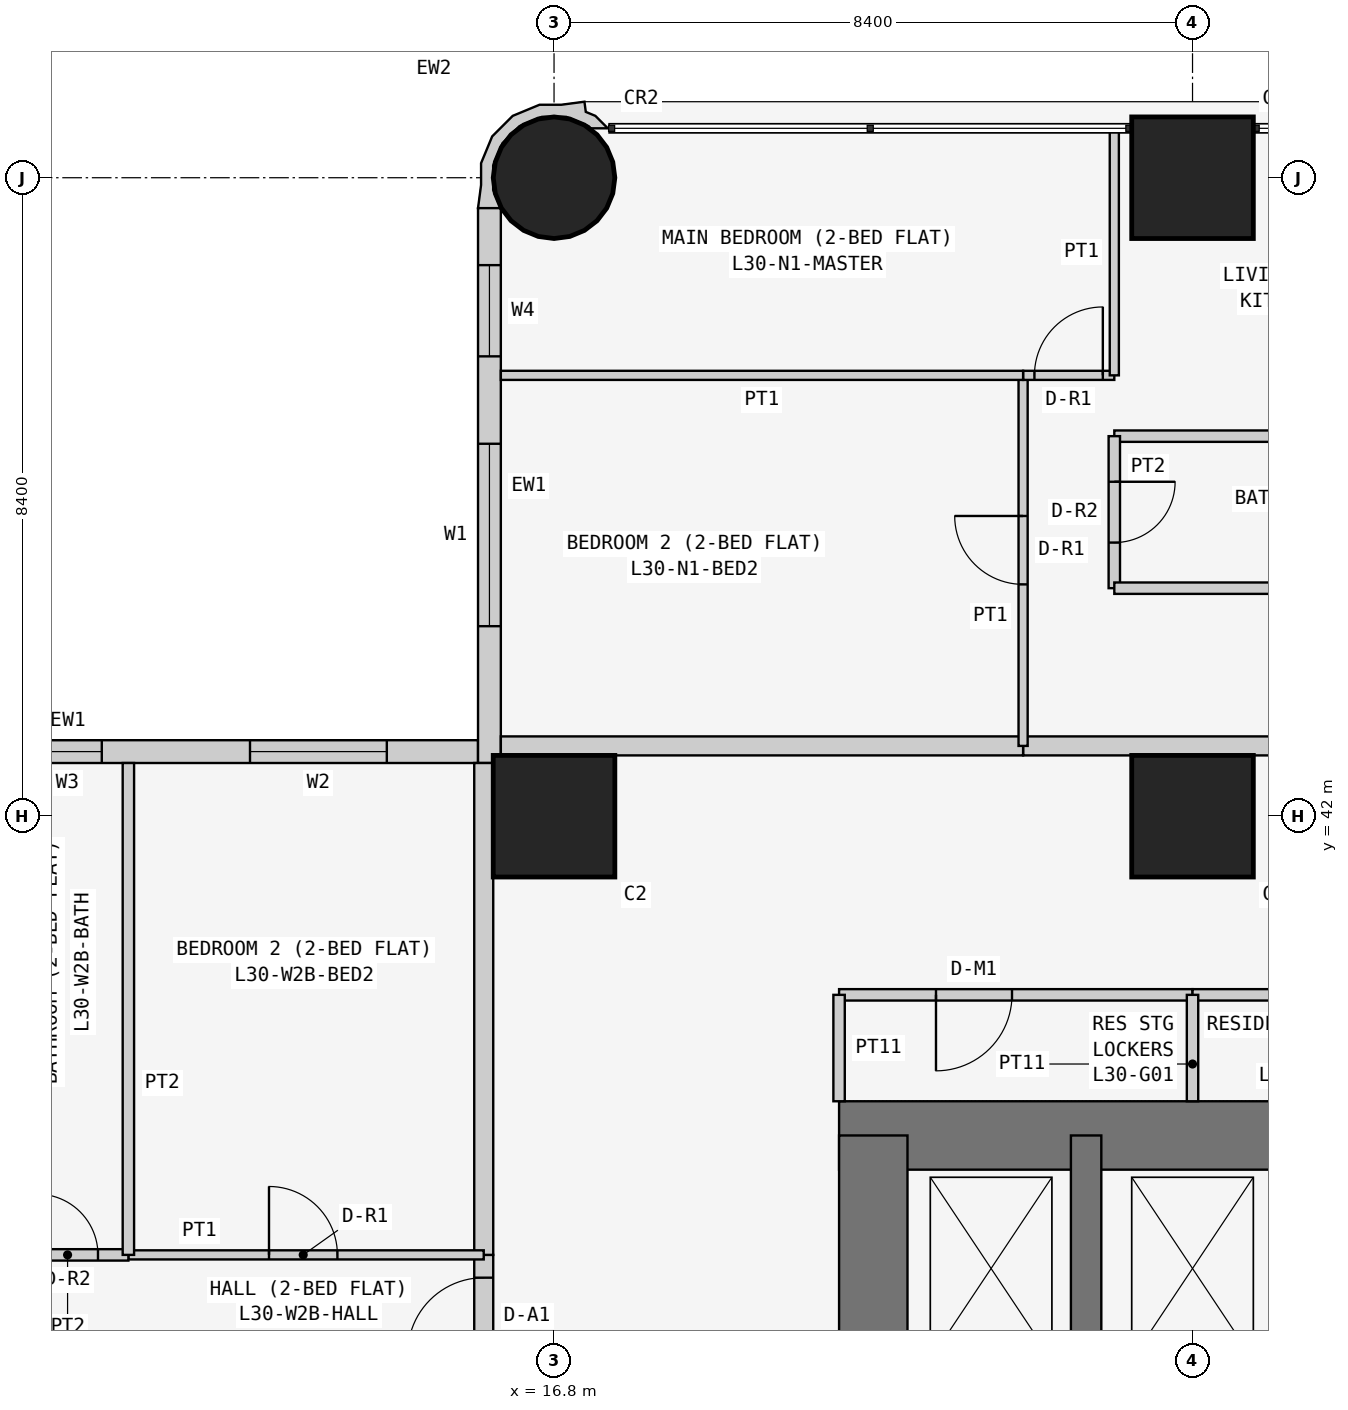
"""IFC4 building model, lengths in metres.
Left out: names, types, materials, properties, quantities, classifications, styles, units other than length and angle.
Written with IfcOpenShell. Run it as: python <this file> out.ifc"""

import sys

from ifc_helpers import new_model, si_unit, direction, frame, frame_2d, origin, origin_2d, place, context, subcontext, project, spatial, polyline, rectangle, circle, outline, extrude, element, fill, save


model = new_model("IFC4")
c1 = context("Model", 3, precision=1e-05, world=origin(), true_north=direction((0.0, 1.0)))
c2 = subcontext(c1, "Body", "Model", "MODEL_VIEW")
j1 = project(units=[si_unit("LENGTHUNIT", "METRE"), si_unit("PLANEANGLEUNIT", "RADIAN")], contexts=[c1])
p1 = place(None, origin())
s1 = spatial("IfcSite", under=j1, at=p1, CompositionType="ELEMENT")
p2 = place(p1, origin())
s2 = spatial("IfcBuilding", under=s1, at=p2, CompositionType="ELEMENT")
p3 = place(p2, frame((0.0, 0.0, 119.7)))
s3 = spatial("IfcBuildingStorey", under=s2, at=p3, CompositionType="ELEMENT", Elevation=119.7)
p4 = place(p3, frame((16.8, 42.0, 0.0), z_axis=(0.0, 0.0, 1.0), x_axis=(1.0, 0.0, 0.0)))
e1 = element("IfcColumn", 1, at=p4, inside=s3, PredefinedType="COLUMN", context=c2, shape_type="SweptSolid", body=[
    extrude(rectangle(XDim=1.6, YDim=1.6, at=origin_2d()), origin(), (0.0, 0.0, 1.0), 3.6),
])
p5 = place(p3, frame((16.8, 50.4, 0.0), z_axis=(0.0, 0.0, 1.0), x_axis=(1.0, 0.0, 0.0)))
e2 = element("IfcColumn", 2, at=p5, inside=s3, PredefinedType="COLUMN", context=c2, shape_type="SweptSolid", body=[
    extrude(circle(Radius=0.8, at=origin_2d()), origin(), (0.0, 0.0, 1.0), 3.6),
])
for number, where, z_axis, x_axis in (
    (3, (25.2, 42.0, 0.0), (0.0, 0.0, 1.0), (1.0, 0.0, 0.0)),
    (4, (25.2, 50.4, 0.0), (0.0, 0.0, 1.0), (1.0, 0.0, 0.0)),
):
    element("IfcColumn", number, at=place(p3, frame(where, z_axis=z_axis, x_axis=x_axis)), inside=s3, PredefinedType="COLUMN", context=c2, shape_type="SweptSolid", body=[
        extrude(rectangle(XDim=1.6, YDim=1.6, at=origin_2d()), origin(), (0.0, 0.0, 1.0), 3.6),
    ])
p6 = place(p3, frame((37.8, 37.8, 0.0), z_axis=(0.0, 0.0, 1.0), x_axis=(-1.0, 0.0, 0.0)))
e5 = element("IfcWall", 5, at=p6, inside=s3, PredefinedType="SHEAR", context=c2, shape_type="SweptSolid", body=[
    extrude(rectangle(XDim=17.25, YDim=0.9, at=frame_2d((8.625, 0.0))), origin(), (0.0, 0.0, 1.0), 3.6),
])
p7 = place(p3, frame((21.0, 37.8, 0.0), z_axis=(0.0, 0.0, 1.0), x_axis=(0.0, -1.0, 0.0)))
e6 = element("IfcWall", 6, at=p7, inside=s3, PredefinedType="SHEAR", context=c2, shape_type="SweptSolid", body=[
    extrude(rectangle(XDim=17.25, YDim=0.9, at=frame_2d((8.625, 0.0))), origin(), (0.0, 0.0, 1.0), 3.6),
])
p8 = place(p7, frame((5.4, 0.0, 0.0)))
e7 = element("IfcOpeningElement", 7, at=p8, cuts=e6, PredefinedType="OPENING", context=c2, shape_type="SweptSolid", body=[
    extrude(rectangle(XDim=1.2, YDim=2.1, at=frame_2d((0.6, 1.05))), frame((0.0, 0.46, 0.0), z_axis=(0.0, -1.0, 0.0), x_axis=(1.0, 0.0, 0.0)), (0.0, 0.0, 1.0), 0.92),
])
p9 = place(p3, frame((23.8, 34.6, 0.0), z_axis=(0.0, 0.0, 1.0), x_axis=(0.0, 1.0, 0.0)))
e8 = element("IfcWall", 8, at=p9, inside=s3, PredefinedType="SHEAR", context=c2, shape_type="SweptSolid", body=[
    extrude(rectangle(XDim=3.2, YDim=0.4, at=frame_2d((1.6, 0.0))), origin(), (0.0, 0.0, 1.0), 3.6),
])
p10 = place(p3, frame((15.8, 42.85, 0.0), z_axis=(0.0, 0.0, 1.0), x_axis=(-1.0, 0.0, 0.0)))
e9 = element("IfcWall", 9, at=p10, inside=s3, PredefinedType="SOLIDWALL", context=c2, shape_type="SweptSolid", body=[
    extrude(rectangle(XDim=15.4, YDim=0.3, at=frame_2d((7.7, 0.0))), origin(), (0.0, 0.0, 1.0), 3.45),
])
p11 = place(p10, frame((1.2, 0.0, 0.9)))
e10 = element("IfcOpeningElement", 10, at=p11, cuts=e9, PredefinedType="OPENING", context=c2, shape_type="SweptSolid", body=[
    extrude(rectangle(XDim=1.8, YDim=1.5, at=frame_2d((0.9, 0.75))), frame((0.0, 0.16, 0.0), z_axis=(0.0, -1.0, 0.0), x_axis=(1.0, 0.0, 0.0)), (0.0, 0.0, 1.0), 0.32),
])
p12 = place(p10, frame((4.95, 0.0, 1.5)))
e11 = element("IfcOpeningElement", 11, at=p12, cuts=e9, PredefinedType="OPENING", context=c2, shape_type="SweptSolid", body=[
    extrude(rectangle(XDim=0.9, YDim=0.7, at=frame_2d((0.45, 0.35))), frame((0.0, 0.16, 0.0), z_axis=(0.0, -1.0, 0.0), x_axis=(1.0, 0.0, 0.0)), (0.0, 0.0, 1.0), 0.32),
])
p13 = place(p10, frame((8.5, 0.0, 0.9)))
e12 = element("IfcOpeningElement", 12, at=p13, cuts=e9, PredefinedType="OPENING", context=c2, shape_type="SweptSolid", body=[
    extrude(rectangle(XDim=1.8, YDim=1.5, at=frame_2d((0.9, 0.75))), frame((0.0, 0.16, 0.0), z_axis=(0.0, -1.0, 0.0), x_axis=(1.0, 0.0, 0.0)), (0.0, 0.0, 1.0), 0.32),
])
p14 = place(p10, frame((12.5, 0.0, 0.0)))
e13 = element("IfcOpeningElement", 13, at=p14, cuts=e9, PredefinedType="OPENING", context=c2, shape_type="SweptSolid", body=[
    extrude(rectangle(XDim=0.9, YDim=2.4, at=frame_2d((0.45, 1.2))), frame((0.0, 0.16, 0.0), z_axis=(0.0, -1.0, 0.0), x_axis=(1.0, 0.0, 0.0)), (0.0, 0.0, 1.0), 0.32),
])
p15 = place(p10, frame((13.5, 0.0, 0.9)))
e14 = element("IfcOpeningElement", 14, at=p15, cuts=e9, PredefinedType="OPENING", context=c2, shape_type="SweptSolid", body=[
    extrude(rectangle(XDim=1.2, YDim=1.5, at=frame_2d((0.6, 0.75))), frame((0.0, 0.16, 0.0), z_axis=(0.0, -1.0, 0.0), x_axis=(1.0, 0.0, 0.0)), (0.0, 0.0, 1.0), 0.32),
])
p16 = place(p3, frame((15.95, 50.0, 0.0), z_axis=(0.0, 0.0, 1.0), x_axis=(0.0, -1.0, 0.0)))
e15 = element("IfcWall", 15, at=p16, inside=s3, PredefinedType="SOLIDWALL", context=c2, shape_type="SweptSolid", body=[
    extrude(rectangle(XDim=7.3, YDim=0.3, at=frame_2d((3.65, 0.0))), origin(), (0.0, 0.0, 1.0), 3.45),
])
p17 = place(p16, frame((3.1, 0.0, 0.9)))
e16 = element("IfcOpeningElement", 16, at=p17, cuts=e15, PredefinedType="OPENING", context=c2, shape_type="SweptSolid", body=[
    extrude(rectangle(XDim=2.4, YDim=1.5, at=frame_2d((1.2, 0.75))), frame((0.0, 0.16, 0.0), z_axis=(0.0, -1.0, 0.0), x_axis=(1.0, 0.0, 0.0)), (0.0, 0.0, 1.0), 0.32),
])
p18 = place(p16, frame((0.75, 0.0, 0.9)))
e17 = element("IfcOpeningElement", 17, at=p18, cuts=e15, PredefinedType="OPENING", context=c2, shape_type="SweptSolid", body=[
    extrude(rectangle(XDim=1.2, YDim=1.5, at=frame_2d((0.6, 0.75))), frame((0.0, 0.16, 0.0), z_axis=(0.0, -1.0, 0.0), x_axis=(1.0, 0.0, 0.0)), (0.0, 0.0, 1.0), 0.32),
])
p19 = place(p3, frame((17.448, 50.995, 0.0), z_axis=(0.0, 0.0, 1.0), x_axis=(-0.343276641956, 0.93923434088, 0.0)))
e18 = element("IfcWall", 18, at=p19, inside=s3, PredefinedType="SOLIDWALL", context=c2, shape_type="SweptSolid", body=[
    extrude(outline(polyline([(0.241, 0.023), (0.333, 0.124), (0.465, 0.094), (0.532, 0.393), (0.631, 0.663), (0.614, 1.045), (0.454, 1.391), (0.172, 1.649), (-0.098, 1.748), (-0.369, 1.89), (-0.509, 1.621), (-0.491, 1.615), (-0.479, 1.609), (-0.211, 1.62), (0.088, 1.511), (0.323, 1.295), (0.457, 1.006), (0.47, 0.688), (0.361, 0.389), (0.145, 0.154), (0.108, 0.137), (0.031, -0.075), (0.241, 0.023)])), origin(), (0.0, 0.0, 1.0), 3.45),
])
p20 = place(p3, frame((25.2, 39.65, 0.0), z_axis=(0.0, 0.0, 1.0), x_axis=(-1.0, 0.0, 0.0)))
e19 = element("IfcWall", 19, at=p20, inside=s3, PredefinedType="PARTITIONING", context=c2, shape_type="SweptSolid", body=[
    extrude(rectangle(XDim=4.65, YDim=0.15, at=frame_2d((2.325, 0.0))), origin(), (0.0, 0.0, 1.0), 3.45),
])
p21 = place(p20, frame((2.375, 0.0, 0.0)))
e20 = element("IfcOpeningElement", 20, at=p21, cuts=e19, PredefinedType="OPENING", context=c2, shape_type="SweptSolid", body=[
    extrude(rectangle(XDim=1.0, YDim=2.1, at=frame_2d((0.5, 1.05))), frame((0.0, 0.085, 0.0), z_axis=(0.0, -1.0, 0.0), x_axis=(1.0, 0.0, 0.0)), (0.0, 0.0, 1.0), 0.17),
])
p22 = place(p3, frame((20.55, 39.65, 0.0), z_axis=(0.0, 0.0, 1.0), x_axis=(0.0, -1.0, 0.0)))
e21 = element("IfcWall", 21, at=p22, inside=s3, PredefinedType="PARTITIONING", context=c2, shape_type="SweptSolid", body=[
    extrude(rectangle(XDim=1.4, YDim=0.15, at=frame_2d((0.7, 0.0))), origin(), (0.0, 0.0, 1.0), 3.45),
])
p23 = place(p3, frame((32.5, 39.65, 0.0), z_axis=(0.0, 0.0, 1.0), x_axis=(-1.0, 0.0, 0.0)))
e22 = element("IfcWall", 22, at=p23, inside=s3, PredefinedType="PARTITIONING", context=c2, shape_type="SweptSolid", body=[
    extrude(rectangle(XDim=7.3, YDim=0.15, at=frame_2d((3.65, 0.0))), origin(), (0.0, 0.0, 1.0), 3.45),
])
p24 = place(p23, frame((2.6, 0.0, 0.0)))
e23 = element("IfcOpeningElement", 23, at=p24, cuts=e22, PredefinedType="OPENING", context=c2, shape_type="SweptSolid", body=[
    extrude(rectangle(XDim=1.0, YDim=2.1, at=frame_2d((0.5, 1.05))), frame((0.0, 0.085, 0.0), z_axis=(0.0, -1.0, 0.0), x_axis=(1.0, 0.0, 0.0)), (0.0, 0.0, 1.0), 0.17),
])
p25 = place(p3, frame((22.971, 42.925, 0.0), z_axis=(0.0, 0.0, 1.0), x_axis=(1.0, 0.0, 0.0)))
e24 = element("IfcWall", 24, at=p25, inside=s3, PredefinedType="PARTITIONING", context=c2, shape_type="SweptSolid", body=[
    extrude(rectangle(XDim=6.429, YDim=0.25, at=frame_2d((3.214, 0.0))), origin(), (0.0, 0.0, 1.0), 3.45),
])
p26 = place(p25, frame((4.929, 0.0, 0.0)))
e25 = element("IfcOpeningElement", 25, at=p26, cuts=e24, PredefinedType="OPENING", context=c2, shape_type="SweptSolid", body=[
    extrude(rectangle(XDim=1.0, YDim=2.1, at=frame_2d((0.5, 1.05))), frame((0.0, 0.135, 0.0), z_axis=(0.0, -1.0, 0.0), x_axis=(1.0, 0.0, 0.0)), (0.0, 0.0, 1.0), 0.27),
])
p27 = place(p3, frame((16.1, 42.925, 0.0), z_axis=(0.0, 0.0, 1.0), x_axis=(1.0, 0.0, 0.0)))
e26 = element("IfcWall", 26, at=p27, inside=s3, PredefinedType="PARTITIONING", context=c2, shape_type="SweptSolid", body=[
    extrude(rectangle(XDim=6.871, YDim=0.25, at=frame_2d((3.436, 0.0))), origin(), (0.0, 0.0, 1.0), 3.45),
])
p28 = place(p3, frame((15.875, 34.629, 0.0), z_axis=(0.0, 0.0, 1.0), x_axis=(0.0, 1.0, 0.0)))
e27 = element("IfcWall", 27, at=p28, inside=s3, PredefinedType="PARTITIONING", context=c2, shape_type="SweptSolid", body=[
    extrude(rectangle(XDim=1.6, YDim=0.25, at=frame_2d((0.8, 0.0))), origin(), (0.0, 0.0, 1.0), 3.45),
])
p29 = place(p28, frame((0.3, 0.0, 0.0)))
e28 = element("IfcOpeningElement", 28, at=p29, cuts=e27, PredefinedType="OPENING", context=c2, shape_type="SweptSolid", body=[
    extrude(rectangle(XDim=1.0, YDim=2.1, at=frame_2d((0.5, 1.05))), frame((0.0, 0.135, 0.0), z_axis=(0.0, -1.0, 0.0), x_axis=(1.0, 0.0, 0.0)), (0.0, 0.0, 1.0), 0.27),
])
p30 = place(p3, frame((15.875, 36.229, 0.0), z_axis=(0.0, 0.0, 1.0), x_axis=(0.0, 1.0, 0.0)))
e29 = element("IfcWall", 29, at=p30, inside=s3, PredefinedType="PARTITIONING", context=c2, shape_type="SweptSolid", body=[
    extrude(rectangle(XDim=6.471, YDim=0.25, at=frame_2d((3.235, 0.0))), origin(), (0.0, 0.0, 1.0), 3.45),
])
p31 = place(p3, frame((25.2, 38.25, 0.0), z_axis=(0.0, 0.0, 1.0), x_axis=(0.0, 1.0, 0.0)))
e30 = element("IfcWall", 30, at=p31, inside=s3, PredefinedType="PARTITIONING", context=c2, shape_type="SweptSolid", body=[
    extrude(rectangle(XDim=1.4, YDim=0.15, at=frame_2d((0.7, 0.0))), origin(), (0.0, 0.0, 1.0), 2.767),
])
p32 = place(p3, frame((29.4, 47.0, 0.0), z_axis=(0.0, 0.0, 1.0), x_axis=(-1.0, 0.0, 0.0)))
e31 = element("IfcWall", 31, at=p32, inside=s3, PredefinedType="PARTITIONING", context=c2, shape_type="SweptSolid", body=[
    extrude(rectangle(XDim=5.229, YDim=0.15, at=frame_2d((2.615, 0.0))), origin(), (0.0, 0.0, 1.0), 3.45),
])
p33 = place(p3, frame((24.171, 47.0, 0.0), z_axis=(0.0, 0.0, 1.0), x_axis=(0.0, -1.0, 0.0)))
e32 = element("IfcWall", 32, at=p33, inside=s3, PredefinedType="PARTITIONING", context=c2, shape_type="SweptSolid", body=[
    extrude(rectangle(XDim=2.0, YDim=0.15, at=frame_2d((1.0, 0.0))), origin(), (0.0, 0.0, 1.0), 3.45),
])
p34 = place(p33, frame((0.6, 0.0, 0.0)))
e33 = element("IfcOpeningElement", 33, at=p34, cuts=e32, PredefinedType="OPENING", context=c2, shape_type="SweptSolid", body=[
    extrude(rectangle(XDim=0.8, YDim=2.1, at=frame_2d((0.4, 1.05))), frame((0.0, 0.085, 0.0), z_axis=(0.0, -1.0, 0.0), x_axis=(1.0, 0.0, 0.0)), (0.0, 0.0, 1.0), 0.17),
])
p35 = place(p3, frame((24.171, 45.0, 0.0), z_axis=(0.0, 0.0, 1.0), x_axis=(1.0, 0.0, 0.0)))
e34 = element("IfcWall", 34, at=p35, inside=s3, PredefinedType="PARTITIONING", context=c2, shape_type="SweptSolid", body=[
    extrude(rectangle(XDim=5.229, YDim=0.15, at=frame_2d((2.615, 0.0))), origin(), (0.0, 0.0, 1.0), 3.45),
])
p36 = place(p3, frame((22.971, 42.925, 0.0), z_axis=(0.0, 0.0, 1.0), x_axis=(0.0, 1.0, 0.0)))
e35 = element("IfcWall", 35, at=p36, inside=s3, PredefinedType="PARTITIONING", context=c2, shape_type="SweptSolid", body=[
    extrude(rectangle(XDim=4.875, YDim=0.12, at=frame_2d((2.438, 0.0))), origin(), (0.0, 0.0, 1.0), 3.45),
])
p37 = place(p36, frame((2.125, 0.0, 0.0)))
e36 = element("IfcOpeningElement", 36, at=p37, cuts=e35, PredefinedType="OPENING", context=c2, shape_type="SweptSolid", body=[
    extrude(rectangle(XDim=0.9, YDim=2.1, at=frame_2d((0.45, 1.05))), frame((0.0, 0.07, 0.0), z_axis=(0.0, -1.0, 0.0), x_axis=(1.0, 0.0, 0.0)), (0.0, 0.0, 1.0), 0.14),
])
p38 = place(p3, frame((22.971, 47.8, 0.0), z_axis=(0.0, 0.0, 1.0), x_axis=(1.0, 0.0, 0.0)))
e37 = element("IfcWall", 37, at=p38, inside=s3, PredefinedType="PARTITIONING", context=c2, shape_type="SweptSolid", body=[
    extrude(rectangle(XDim=1.2, YDim=0.12, at=frame_2d((0.6, 0.0))), origin(), (0.0, 0.0, 1.0), 3.45),
])
p39 = place(p38, frame((0.149, 0.0, 0.0)))
e38 = element("IfcOpeningElement", 38, at=p39, cuts=e37, PredefinedType="OPENING", context=c2, shape_type="SweptSolid", body=[
    extrude(rectangle(XDim=0.9, YDim=2.1, at=frame_2d((0.45, 1.05))), frame((0.0, 0.07, 0.0), z_axis=(0.0, -1.0, 0.0), x_axis=(1.0, 0.0, 0.0)), (0.0, 0.0, 1.0), 0.14),
])
p40 = place(p3, frame((24.171, 47.8, 0.0), z_axis=(0.0, 0.0, 1.0), x_axis=(0.0, 1.0, 0.0)))
e39 = element("IfcWall", 39, at=p40, inside=s3, PredefinedType="PARTITIONING", context=c2, shape_type="SweptSolid", body=[
    extrude(rectangle(XDim=3.25, YDim=0.12, at=frame_2d((1.625, 0.0))), origin(), (0.0, 0.0, 1.0), 3.45),
])
p41 = place(p3, frame((22.971, 47.8, 0.0), z_axis=(0.0, 0.0, 1.0), x_axis=(-1.0, 0.0, 0.0)))
e40 = element("IfcWall", 40, at=p41, inside=s3, PredefinedType="PARTITIONING", context=c2, shape_type="SweptSolid", body=[
    extrude(rectangle(XDim=6.871, YDim=0.12, at=frame_2d((3.436, 0.0))), origin(), (0.0, 0.0, 1.0), 3.45),
])
p42 = place(p3, frame((11.2, 36.229, 0.0), z_axis=(0.0, 0.0, 1.0), x_axis=(1.0, 0.0, 0.0)))
e41 = element("IfcWall", 41, at=p42, inside=s3, PredefinedType="PARTITIONING", context=c2, shape_type="SweptSolid", body=[
    extrude(rectangle(XDim=4.675, YDim=0.12, at=frame_2d((2.337, 0.0))), origin(), (0.0, 0.0, 1.0), 3.45),
])
p43 = place(p42, frame((1.85, 0.0, 0.0)))
e42 = element("IfcOpeningElement", 42, at=p43, cuts=e41, PredefinedType="OPENING", context=c2, shape_type="SweptSolid", body=[
    extrude(rectangle(XDim=0.9, YDim=2.1, at=frame_2d((0.45, 1.05))), frame((0.0, 0.07, 0.0), z_axis=(0.0, -1.0, 0.0), x_axis=(1.0, 0.0, 0.0)), (0.0, 0.0, 1.0), 0.14),
])
p44 = place(p3, frame((9.6, 36.229, 0.0), z_axis=(0.0, 0.0, 1.0), x_axis=(1.0, 0.0, 0.0)))
e43 = element("IfcWall", 43, at=p44, inside=s3, PredefinedType="PARTITIONING", context=c2, shape_type="SweptSolid", body=[
    extrude(rectangle(XDim=1.6, YDim=0.15, at=frame_2d((0.8, 0.0))), origin(), (0.0, 0.0, 1.0), 3.45),
])
p45 = place(p44, frame((0.4, 0.0, 0.0)))
e44 = element("IfcOpeningElement", 44, at=p45, cuts=e43, PredefinedType="OPENING", context=c2, shape_type="SweptSolid", body=[
    extrude(rectangle(XDim=0.8, YDim=2.1, at=frame_2d((0.4, 1.05))), frame((0.0, 0.085, 0.0), z_axis=(0.0, -1.0, 0.0), x_axis=(1.0, 0.0, 0.0)), (0.0, 0.0, 1.0), 0.17),
])
p46 = place(p3, frame((11.2, 36.229, 0.0), z_axis=(0.0, 0.0, 1.0), x_axis=(0.0, 1.0, 0.0)))
e45 = element("IfcWall", 45, at=p46, inside=s3, PredefinedType="PARTITIONING", context=c2, shape_type="SweptSolid", body=[
    extrude(rectangle(XDim=6.471, YDim=0.15, at=frame_2d((3.235, 0.0))), origin(), (0.0, 0.0, 1.0), 3.45),
])
p47 = place(p17, origin())
e46 = element("IfcWindow", 46, at=p47, inside=s3, PartitioningType="SINGLE_PANEL", PredefinedType="WINDOW", context=c2, shape_type="SweptSolid", body=[
    extrude(rectangle(XDim=2.4, YDim=1.5, at=frame_2d((1.2, 0.75))), frame((0.0, 0.03, 0.0), z_axis=(0.0, -1.0, 0.0), x_axis=(1.0, 0.0, 0.0)), (0.0, 0.0, 1.0), 0.06),
])
fill(e16, e46)
p48 = place(p18, origin())
e47 = element("IfcWindow", 47, at=p48, inside=s3, PartitioningType="SINGLE_PANEL", PredefinedType="WINDOW", context=c2, shape_type="SweptSolid", body=[
    extrude(rectangle(XDim=1.2, YDim=1.5, at=frame_2d((0.6, 0.75))), frame((0.0, 0.03, 0.0), z_axis=(0.0, -1.0, 0.0), x_axis=(1.0, 0.0, 0.0)), (0.0, 0.0, 1.0), 0.06),
])
fill(e17, e47)
p49 = place(p11, origin())
e48 = element("IfcWindow", 48, at=p49, inside=s3, PartitioningType="SINGLE_PANEL", PredefinedType="WINDOW", context=c2, shape_type="SweptSolid", body=[
    extrude(rectangle(XDim=1.8, YDim=1.5, at=frame_2d((0.9, 0.75))), frame((0.0, 0.03, 0.0), z_axis=(0.0, -1.0, 0.0), x_axis=(1.0, 0.0, 0.0)), (0.0, 0.0, 1.0), 0.06),
])
fill(e10, e48)
p50 = place(p12, origin())
e49 = element("IfcWindow", 49, at=p50, inside=s3, PartitioningType="SINGLE_PANEL", PredefinedType="WINDOW", context=c2, shape_type="SweptSolid", body=[
    extrude(rectangle(XDim=0.9, YDim=0.7, at=frame_2d((0.45, 0.35))), frame((0.0, 0.03, 0.0), z_axis=(0.0, -1.0, 0.0), x_axis=(1.0, 0.0, 0.0)), (0.0, 0.0, 1.0), 0.06),
])
fill(e11, e49)
p51 = place(p21, origin())
e50 = element("IfcDoor", 50, at=p51, inside=s3, OperationType="SINGLE_SWING_RIGHT", PredefinedType="DOOR", context=c2, shape_type="SweptSolid", body=[
    extrude(rectangle(XDim=1.0, YDim=2.1, at=frame_2d((0.5, 1.05))), frame((0.0, 0.025, 0.0), z_axis=(0.0, -1.0, 0.0), x_axis=(1.0, 0.0, 0.0)), (0.0, 0.0, 1.0), 0.05),
])
fill(e20, e50)
p52 = place(p34, origin())
e51 = element("IfcDoor", 51, at=p52, inside=s3, OperationType="SINGLE_SWING_LEFT", PredefinedType="DOOR", context=c2, shape_type="SweptSolid", body=[
    extrude(rectangle(XDim=0.8, YDim=2.1, at=frame_2d((0.4, 1.05))), frame((0.0, 0.025, 0.0), z_axis=(0.0, -1.0, 0.0), x_axis=(1.0, 0.0, 0.0)), (0.0, 0.0, 1.0), 0.05),
])
fill(e33, e51)
p53 = place(p37, origin())
e52 = element("IfcDoor", 52, at=p53, inside=s3, OperationType="SINGLE_SWING_RIGHT", PredefinedType="DOOR", context=c2, shape_type="SweptSolid", body=[
    extrude(rectangle(XDim=0.9, YDim=2.1, at=frame_2d((0.45, 1.05))), frame((0.0, 0.025, 0.0), z_axis=(0.0, -1.0, 0.0), x_axis=(1.0, 0.0, 0.0)), (0.0, 0.0, 1.0), 0.05),
])
fill(e36, e52)
p54 = place(p39, origin())
e53 = element("IfcDoor", 53, at=p54, inside=s3, OperationType="SINGLE_SWING_RIGHT", PredefinedType="DOOR", context=c2, shape_type="SweptSolid", body=[
    extrude(rectangle(XDim=0.9, YDim=2.1, at=frame_2d((0.45, 1.05))), frame((0.0, 0.025, 0.0), z_axis=(0.0, -1.0, 0.0), x_axis=(1.0, 0.0, 0.0)), (0.0, 0.0, 1.0), 0.05),
])
fill(e38, e53)
p55 = place(p29, origin())
e54 = element("IfcDoor", 54, at=p55, inside=s3, OperationType="SINGLE_SWING_LEFT", PredefinedType="DOOR", context=c2, shape_type="SweptSolid", body=[
    extrude(rectangle(XDim=1.0, YDim=2.1, at=frame_2d((0.5, 1.05))), frame((0.0, 0.025, 0.0), z_axis=(0.0, -1.0, 0.0), x_axis=(1.0, 0.0, 0.0)), (0.0, 0.0, 1.0), 0.05),
])
fill(e28, e54)
p56 = place(p43, origin())
e55 = element("IfcDoor", 55, at=p56, inside=s3, OperationType="SINGLE_SWING_LEFT", PredefinedType="DOOR", context=c2, shape_type="SweptSolid", body=[
    extrude(rectangle(XDim=0.9, YDim=2.1, at=frame_2d((0.45, 1.05))), frame((0.0, 0.025, 0.0), z_axis=(0.0, -1.0, 0.0), x_axis=(1.0, 0.0, 0.0)), (0.0, 0.0, 1.0), 0.05),
])
fill(e42, e55)
p57 = place(p45, origin())
e56 = element("IfcDoor", 56, at=p57, inside=s3, OperationType="SINGLE_SWING_LEFT", PredefinedType="DOOR", context=c2, shape_type="SweptSolid", body=[
    extrude(rectangle(XDim=0.8, YDim=2.1, at=frame_2d((0.4, 1.05))), frame((0.0, 0.025, 0.0), z_axis=(0.0, -1.0, 0.0), x_axis=(1.0, 0.0, 0.0)), (0.0, 0.0, 1.0), 0.05),
])
fill(e44, e56)
save(model, sys.argv[1])
